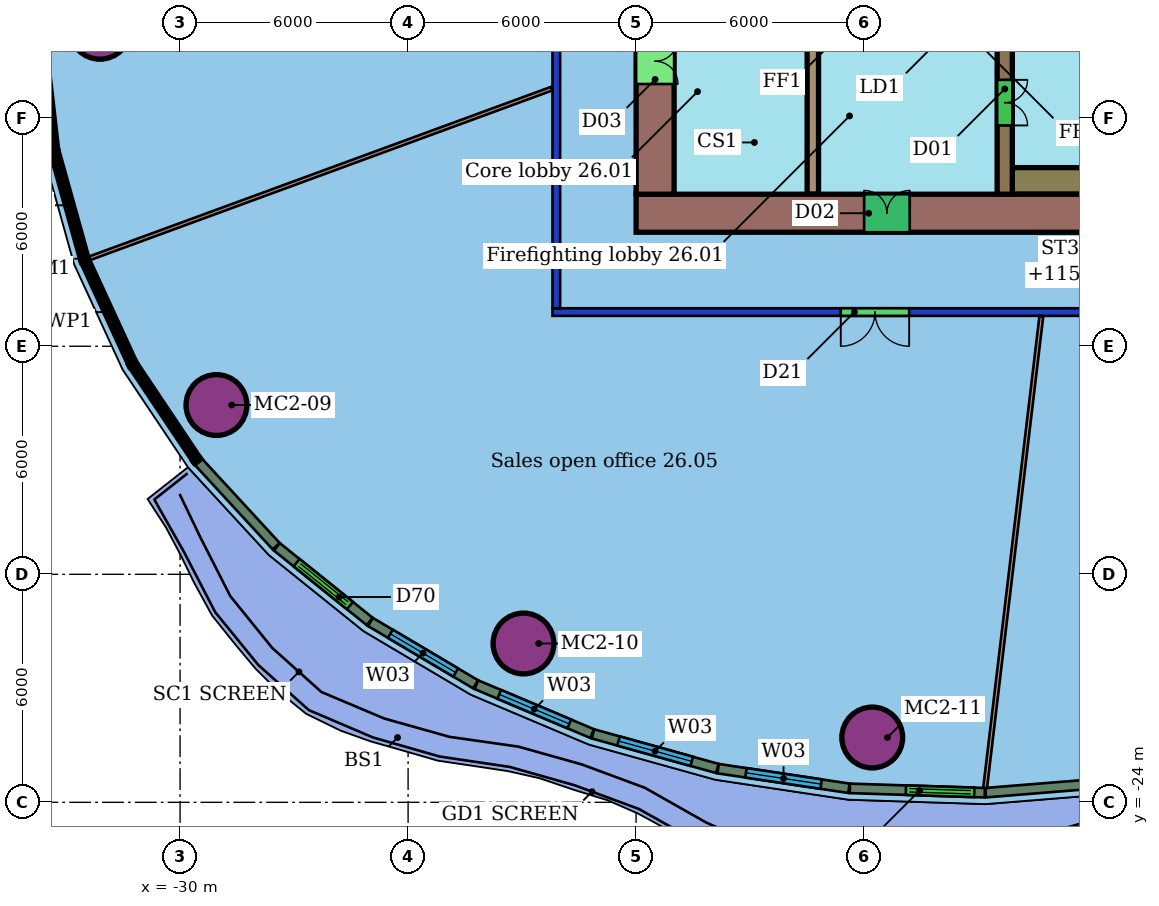
"""IFC4 building model, lengths in metres.
Left out: names, types, materials, properties, quantities, classifications, styles, units other than length and angle.
Written with IfcOpenShell. Run it as: python <this file> out.ifc"""

import sys

from ifc_helpers import new_model, si_unit, direction, frame, frame_2d, origin, origin_2d, place, context, subcontext, project, spatial, rectangle, hollow_circle, extrude, element, fill, save


model = new_model("IFC4")
c1 = context("Model", 3, precision=1e-05, world=origin(), true_north=direction((0.0, 1.0)))
c2 = subcontext(c1, "Body", "Model", "MODEL_VIEW")
j1 = project(units=[si_unit("LENGTHUNIT", "METRE"), si_unit("PLANEANGLEUNIT", "RADIAN")], contexts=[c1])
p1 = place(None, origin())
s1 = spatial("IfcSite", under=j1, at=p1, CompositionType="ELEMENT")
p2 = place(p1, origin())
s2 = spatial("IfcBuilding", under=s1, at=p2, CompositionType="ELEMENT")
p3 = place(p2, frame((0.0, 0.0, 113.8)))
s3 = spatial("IfcBuildingStorey", under=s2, at=p3, CompositionType="ELEMENT", Elevation=113.8)
for number, where, z_axis, x_axis in (
    (1, (-32.109, -3.646, 0.0), (0.0, 0.0, 1.0), (1.0, 0.0, 0.0)),
    (2, (-29.043, -13.547, 0.0), (0.0, 0.0, 1.0), (1.0, 0.0, 0.0)),
    (3, (-20.963, -19.821, 0.0), (0.0, 0.0, 1.0), (1.0, 0.0, 0.0)),
    (4, (-11.787, -22.294, 0.0), (0.0, 0.0, 1.0), (1.0, 0.0, 0.0)),
):
    element("IfcColumn", number, at=place(p3, frame(where, z_axis=z_axis, x_axis=x_axis)), inside=s3, PredefinedType="COLUMN", context=c2, shape_type="SweptSolid", body=[
        extrude(hollow_circle(Radius=0.8, WallThickness=0.055, at=origin_2d()), origin(), (0.0, 0.0, 1.0), 3.45),
    ])
p4 = place(p3, frame((8.2, -11.1, 0.0), z_axis=(0.0, 0.0, 1.0), x_axis=(-1.0, 0.0, 0.0)))
e5 = element("IfcWall", 5, at=p4, inside=s3, PredefinedType="PARTITIONING", context=c2, shape_type="SweptSolid", body=[
    extrude(rectangle(XDim=28.4, YDim=0.2, at=frame_2d((14.2, 0.0))), origin(), (0.0, 0.0, 1.0), 3.0),
])
p5 = place(p4, frame((19.015, 0.0, 0.0)))
e6 = element("IfcOpeningElement", 6, at=p5, cuts=e5, PredefinedType="OPENING", context=c2, shape_type="SweptSolid", body=[
    extrude(rectangle(XDim=1.8, YDim=2.1, at=frame_2d((0.9, 1.05))), frame((0.0, 0.11, 0.0), z_axis=(0.0, -1.0, 0.0), x_axis=(1.0, 0.0, 0.0)), (0.0, 0.0, 1.0), 0.22),
])
p6 = place(p4, frame((9.455, 0.0, 0.0)))
e7 = element("IfcOpeningElement", 7, at=p6, cuts=e5, PredefinedType="OPENING", context=c2, shape_type="SweptSolid", body=[
    extrude(rectangle(XDim=1.8, YDim=2.1, at=frame_2d((0.9, 1.05))), frame((0.0, 0.11, 0.0), z_axis=(0.0, -1.0, 0.0), x_axis=(1.0, 0.0, 0.0)), (0.0, 0.0, 1.0), 0.22),
])
p7 = place(p3, frame((-20.1, -11.0, 0.0), z_axis=(0.0, 0.0, 1.0), x_axis=(0.0, 1.0, 0.0)))
e8 = element("IfcWall", 8, at=p7, inside=s3, PredefinedType="PARTITIONING", context=c2, shape_type="SweptSolid", body=[
    extrude(rectangle(XDim=22.0, YDim=0.2, at=frame_2d((11.0, 0.0))), origin(), (0.0, 0.0, 1.0), 3.0),
])
p8 = place(p7, frame((9.103, 0.0, 0.0)))
e9 = element("IfcOpeningElement", 9, at=p8, cuts=e8, PredefinedType="OPENING", context=c2, shape_type="SweptSolid", body=[
    extrude(rectangle(XDim=1.8, YDim=2.1, at=frame_2d((0.9, 1.05))), frame((0.0, 0.11, 0.0), z_axis=(0.0, -1.0, 0.0), x_axis=(1.0, 0.0, 0.0)), (0.0, 0.0, 1.0), 0.22),
])
p9 = place(p3, frame((-32.393, -9.69, 0.0), z_axis=(0.0, 0.0, 1.0), x_axis=(0.93873651108, 0.344635695722, 0.0)))
e10 = element("IfcWall", 10, at=p9, inside=s3, PredefinedType="PARTITIONING", context=c2, shape_type="SweptSolid", body=[
    extrude(rectangle(XDim=12.97, YDim=0.1, at=frame_2d((6.485, 0.0))), origin(), (0.0, 0.0, 1.0), 3.45),
])
p10 = place(p3, frame((-8.817, -23.622, 0.0), z_axis=(0.0, 0.0, 1.0), x_axis=(0.118395318252, 0.992966539525, 0.0)))
e11 = element("IfcWall", 11, at=p10, inside=s3, PredefinedType="PARTITIONING", context=c2, shape_type="SweptSolid", body=[
    extrude(rectangle(XDim=12.504, YDim=0.1, at=frame_2d((6.252, 0.0))), origin(), (0.0, 0.0, 1.0), 3.45),
])
p11 = place(p3, frame((-29.52, -15.038, 0.0), z_axis=(0.0, 0.0, 1.0), x_axis=(0.677632184293, -0.735400994567, 0.0)))
e12 = element("IfcWall", 12, at=p11, inside=s3, PredefinedType="SOLIDWALL", context=c2, shape_type="SweptSolid", body=[
    extrude(rectangle(XDim=3.022, YDim=0.25, at=frame_2d((1.511, 0.0))), origin(), (0.0, 0.0, 1.0), 3.05),
])
p12 = place(p3, frame((-27.453, -17.278, 0.0), z_axis=(0.0, 0.0, 1.0), x_axis=(0.779353281229, -0.626584761256, 0.0)))
e13 = element("IfcWall", 13, at=p12, inside=s3, PredefinedType="SOLIDWALL", context=c2, shape_type="SweptSolid", body=[
    extrude(rectangle(XDim=3.132, YDim=0.25, at=frame_2d((1.566, 0.0))), origin(), (0.0, 0.0, 1.0), 3.05),
])
p13 = place(p12, frame((0.666, 0.0, 0.0)))
e14 = element("IfcOpeningElement", 14, at=p13, cuts=e13, PredefinedType="OPENING", context=c2, shape_type="SweptSolid", body=[
    extrude(rectangle(XDim=1.8, YDim=2.4, at=frame_2d((0.9, 1.2))), frame((0.0, 0.135, 0.0), z_axis=(0.0, -1.0, 0.0), x_axis=(1.0, 0.0, 0.0)), (0.0, 0.0, 1.0), 0.27),
])
p14 = place(p3, frame((-24.99, -19.255, 0.0), z_axis=(0.0, 0.0, 1.0), x_axis=(0.860327301237, -0.509742027644, 0.0)))
e15 = element("IfcWall", 15, at=p14, inside=s3, PredefinedType="SOLIDWALL", context=c2, shape_type="SweptSolid", body=[
    extrude(rectangle(XDim=3.215, YDim=0.25, at=frame_2d((1.607, 0.0))), origin(), (0.0, 0.0, 1.0), 3.05),
])
p15 = place(p14, frame((0.607, 0.0, 0.9)))
e16 = element("IfcOpeningElement", 16, at=p15, cuts=e15, PredefinedType="OPENING", context=c2, shape_type="SweptSolid", body=[
    extrude(rectangle(XDim=2.0, YDim=2.1, at=frame_2d((1.0, 1.05))), frame((0.0, 0.135, 0.0), z_axis=(0.0, -1.0, 0.0), x_axis=(1.0, 0.0, 0.0)), (0.0, 0.0, 1.0), 0.27),
])
p16 = place(p3, frame((-22.202, -20.906, 0.0), z_axis=(0.0, 0.0, 1.0), x_axis=(0.921226028589, -0.389027767967, 0.0)))
e17 = element("IfcWall", 17, at=p16, inside=s3, PredefinedType="SOLIDWALL", context=c2, shape_type="SweptSolid", body=[
    extrude(rectangle(XDim=3.305, YDim=0.25, at=frame_2d((1.652, 0.0))), origin(), (0.0, 0.0, 1.0), 3.05),
])
p17 = place(p16, frame((0.652, 0.0, 0.9)))
e18 = element("IfcOpeningElement", 18, at=p17, cuts=e17, PredefinedType="OPENING", context=c2, shape_type="SweptSolid", body=[
    extrude(rectangle(XDim=2.0, YDim=2.1, at=frame_2d((1.0, 1.05))), frame((0.0, 0.135, 0.0), z_axis=(0.0, -1.0, 0.0), x_axis=(1.0, 0.0, 0.0)), (0.0, 0.0, 1.0), 0.27),
])
p18 = place(p3, frame((-19.135, -22.199, 0.0), z_axis=(0.0, 0.0, 1.0), x_axis=(0.96343750938, -0.267933136285, 0.0)))
e19 = element("IfcWall", 19, at=p18, inside=s3, PredefinedType="SOLIDWALL", context=c2, shape_type="SweptSolid", body=[
    extrude(rectangle(XDim=3.395, YDim=0.25, at=frame_2d((1.698, 0.0))), origin(), (0.0, 0.0, 1.0), 3.05),
])
p19 = place(p18, frame((0.698, 0.0, 0.9)))
e20 = element("IfcOpeningElement", 20, at=p19, cuts=e19, PredefinedType="OPENING", context=c2, shape_type="SweptSolid", body=[
    extrude(rectangle(XDim=2.0, YDim=2.1, at=frame_2d((1.0, 1.05))), frame((0.0, 0.135, 0.0), z_axis=(0.0, -1.0, 0.0), x_axis=(1.0, 0.0, 0.0)), (0.0, 0.0, 1.0), 0.27),
])
p20 = place(p3, frame((-15.841, -23.114, 0.0), z_axis=(0.0, 0.0, 1.0), x_axis=(0.98891112558, -0.14850853748, 0.0)))
e21 = element("IfcWall", 21, at=p20, inside=s3, PredefinedType="SOLIDWALL", context=c2, shape_type="SweptSolid", body=[
    extrude(rectangle(XDim=3.48, YDim=0.25, at=frame_2d((1.74, 0.0))), origin(), (0.0, 0.0, 1.0), 3.05),
])
p21 = place(p20, frame((0.74, 0.0, 0.9)))
e22 = element("IfcOpeningElement", 22, at=p21, cuts=e21, PredefinedType="OPENING", context=c2, shape_type="SweptSolid", body=[
    extrude(rectangle(XDim=2.0, YDim=2.1, at=frame_2d((1.0, 1.05))), frame((0.0, 0.135, 0.0), z_axis=(0.0, -1.0, 0.0), x_axis=(1.0, 0.0, 0.0)), (0.0, 0.0, 1.0), 0.27),
])
p22 = place(p3, frame((-12.377, -23.633, 0.0), z_axis=(0.0, 0.0, 1.0), x_axis=(0.99948104208, -0.032212521216, 0.0)))
e23 = element("IfcWall", 23, at=p22, inside=s3, PredefinedType="SOLIDWALL", context=c2, shape_type="SweptSolid", body=[
    extrude(rectangle(XDim=3.555, YDim=0.25, at=frame_2d((1.777, 0.0))), origin(), (0.0, 0.0, 1.0), 3.05),
])
p23 = place(p22, frame((1.477, 0.0, 0.0)))
e24 = element("IfcOpeningElement", 24, at=p23, cuts=e23, PredefinedType="OPENING", context=c2, shape_type="SweptSolid", body=[
    extrude(rectangle(XDim=1.8, YDim=2.4, at=frame_2d((0.9, 1.2))), frame((0.0, 0.135, 0.0), z_axis=(0.0, -1.0, 0.0), x_axis=(1.0, 0.0, 0.0)), (0.0, 0.0, 1.0), 0.27),
])
p24 = place(p3, frame((-8.802, -23.747, 0.0), z_axis=(0.0, 0.0, 1.0), x_axis=(0.996755199543, 0.080492684039, 0.0)))
e25 = element("IfcWall", 25, at=p24, inside=s3, PredefinedType="SOLIDWALL", context=c2, shape_type="SweptSolid", body=[
    extrude(rectangle(XDim=3.57, YDim=0.25, at=frame_2d((1.785, 0.0))), origin(), (0.0, 0.0, 1.0), 3.05),
])
p25 = place(p3, frame((-18.0, -8.5, 0.0), z_axis=(0.0, 0.0, 1.0), x_axis=(1.0, 0.0, 0.0)))
e26 = element("IfcWall", 26, at=p25, inside=s3, PredefinedType="SHEAR", context=c2, shape_type="SweptSolid", body=[
    extrude(rectangle(XDim=24.0, YDim=1.0, at=frame_2d((12.0, 0.0))), origin(), (0.0, 0.0, 1.0), 3.3),
])
p26 = place(p25, frame((6.0, 0.0, 0.0)))
e27 = element("IfcOpeningElement", 27, at=p26, cuts=e26, PredefinedType="OPENING", context=c2, shape_type="SweptSolid", body=[
    extrude(rectangle(XDim=1.2, YDim=2.1, at=frame_2d((0.6, 1.05))), frame((0.0, 0.51, 0.0), z_axis=(0.0, -1.0, 0.0), x_axis=(1.0, 0.0, 0.0)), (0.0, 0.0, 1.0), 1.02),
])
p27 = place(p3, frame((-17.5, 8.0, 0.0), z_axis=(0.0, 0.0, 1.0), x_axis=(0.0, -1.0, 0.0)))
e28 = element("IfcWall", 28, at=p27, inside=s3, PredefinedType="SHEAR", context=c2, shape_type="SweptSolid", body=[
    extrude(rectangle(XDim=16.0, YDim=1.0, at=frame_2d((8.0, 0.0))), origin(), (0.0, 0.0, 1.0), 3.3),
])
p28 = place(p27, frame((11.9, 0.0, 0.0)))
e29 = element("IfcOpeningElement", 29, at=p28, cuts=e28, PredefinedType="OPENING", context=c2, shape_type="SweptSolid", body=[
    extrude(rectangle(XDim=1.2, YDim=2.1, at=frame_2d((0.6, 1.05))), frame((0.0, 0.51, 0.0), z_axis=(0.0, -1.0, 0.0), x_axis=(1.0, 0.0, 0.0)), (0.0, 0.0, 1.0), 1.02),
])
p29 = place(p27, frame((2.9, 0.0, 0.0)))
e30 = element("IfcOpeningElement", 30, at=p29, cuts=e28, PredefinedType="OPENING", context=c2, shape_type="SweptSolid", body=[
    extrude(rectangle(XDim=1.2, YDim=2.1, at=frame_2d((0.6, 1.05))), frame((0.0, 0.51, 0.0), z_axis=(0.0, -1.0, 0.0), x_axis=(1.0, 0.0, 0.0)), (0.0, 0.0, 1.0), 1.02),
])
p30 = place(p3, frame((-13.35, 8.0, 0.0), z_axis=(0.0, 0.0, 1.0), x_axis=(0.0, -1.0, 0.0)))
e31 = element("IfcWall", 31, at=p30, inside=s3, PredefinedType="SHEAR", context=c2, shape_type="SweptSolid", body=[
    extrude(rectangle(XDim=16.0, YDim=0.3, at=frame_2d((8.0, 0.0))), origin(), (0.0, 0.0, 1.0), 3.3),
])
p31 = place(p30, frame((7.25, 0.0, 0.0)))
e32 = element("IfcOpeningElement", 32, at=p31, cuts=e31, PredefinedType="OPENING", context=c2, shape_type="SweptSolid", body=[
    extrude(rectangle(XDim=1.5, YDim=2.1, at=frame_2d((0.75, 1.05))), frame((0.0, 0.16, 0.0), z_axis=(0.0, -1.0, 0.0), x_axis=(1.0, 0.0, 0.0)), (0.0, 0.0, 1.0), 0.32),
])
p32 = place(p3, frame((-8.3, -3.88, 0.0), z_axis=(0.0, 0.0, 1.0), x_axis=(0.0, -1.0, 0.0)))
e33 = element("IfcWall", 33, at=p32, inside=s3, PredefinedType="SHEAR", context=c2, shape_type="SweptSolid", body=[
    extrude(rectangle(XDim=4.12, YDim=0.4, at=frame_2d((2.06, 0.0))), origin(), (0.0, 0.0, 1.0), 3.3),
])
p33 = place(p32, frame((1.11, 0.0, 0.0)))
e34 = element("IfcOpeningElement", 34, at=p33, cuts=e33, PredefinedType="OPENING", context=c2, shape_type="SweptSolid", body=[
    extrude(rectangle(XDim=1.2, YDim=2.1, at=frame_2d((0.6, 1.05))), frame((0.0, 0.21, 0.0), z_axis=(0.0, -1.0, 0.0), x_axis=(1.0, 0.0, 0.0)), (0.0, 0.0, 1.0), 0.42),
])
p34 = place(p3, frame((-8.1, -7.65, 0.0), z_axis=(0.0, 0.0, 1.0), x_axis=(1.0, 0.0, 0.0)))
e35 = element("IfcWall", 35, at=p34, inside=s3, PredefinedType="SHEAR", context=c2, shape_type="SweptSolid", body=[
    extrude(rectangle(XDim=7.05, YDim=0.7, at=frame_2d((3.525, 0.0))), origin(), (0.0, 0.0, 1.0), 3.3),
])
p35 = place(p5, origin())
e36 = element("IfcDoor", 36, at=p35, inside=s3, OperationType="DOUBLE_DOOR_SINGLE_SWING", PredefinedType="DOOR", context=c2, shape_type="SweptSolid", body=[
    extrude(rectangle(XDim=1.8, YDim=2.1, at=frame_2d((0.9, 1.05))), frame((0.0, 0.025, 0.0), z_axis=(0.0, -1.0, 0.0), x_axis=(1.0, 0.0, 0.0)), (0.0, 0.0, 1.0), 0.05),
])
fill(e6, e36)
p36 = place(p13, origin())
e37 = element("IfcDoor", 37, at=p36, inside=s3, OperationType="DOUBLE_DOOR_SLIDING", PredefinedType="DOOR", context=c2, shape_type="SweptSolid", body=[
    extrude(rectangle(XDim=1.8, YDim=2.4, at=frame_2d((0.9, 1.2))), frame((0.0, 0.025, 0.0), z_axis=(0.0, -1.0, 0.0), x_axis=(1.0, 0.0, 0.0)), (0.0, 0.0, 1.0), 0.05),
])
fill(e14, e37)
p37 = place(p15, origin())
e38 = element("IfcWindow", 38, at=p37, inside=s3, PartitioningType="SINGLE_PANEL", PredefinedType="WINDOW", context=c2, shape_type="SweptSolid", body=[
    extrude(rectangle(XDim=2.0, YDim=2.1, at=frame_2d((1.0, 1.05))), frame((0.0, 0.03, 0.0), z_axis=(0.0, -1.0, 0.0), x_axis=(1.0, 0.0, 0.0)), (0.0, 0.0, 1.0), 0.06),
])
fill(e16, e38)
p38 = place(p17, origin())
e39 = element("IfcWindow", 39, at=p38, inside=s3, PartitioningType="SINGLE_PANEL", PredefinedType="WINDOW", context=c2, shape_type="SweptSolid", body=[
    extrude(rectangle(XDim=2.0, YDim=2.1, at=frame_2d((1.0, 1.05))), frame((0.0, 0.03, 0.0), z_axis=(0.0, -1.0, 0.0), x_axis=(1.0, 0.0, 0.0)), (0.0, 0.0, 1.0), 0.06),
])
fill(e18, e39)
p39 = place(p19, origin())
e40 = element("IfcWindow", 40, at=p39, inside=s3, PartitioningType="SINGLE_PANEL", PredefinedType="WINDOW", context=c2, shape_type="SweptSolid", body=[
    extrude(rectangle(XDim=2.0, YDim=2.1, at=frame_2d((1.0, 1.05))), frame((0.0, 0.03, 0.0), z_axis=(0.0, -1.0, 0.0), x_axis=(1.0, 0.0, 0.0)), (0.0, 0.0, 1.0), 0.06),
])
fill(e20, e40)
p40 = place(p21, origin())
e41 = element("IfcWindow", 41, at=p40, inside=s3, PartitioningType="SINGLE_PANEL", PredefinedType="WINDOW", context=c2, shape_type="SweptSolid", body=[
    extrude(rectangle(XDim=2.0, YDim=2.1, at=frame_2d((1.0, 1.05))), frame((0.0, 0.03, 0.0), z_axis=(0.0, -1.0, 0.0), x_axis=(1.0, 0.0, 0.0)), (0.0, 0.0, 1.0), 0.06),
])
fill(e22, e41)
p41 = place(p23, origin())
e42 = element("IfcDoor", 42, at=p41, inside=s3, OperationType="DOUBLE_DOOR_SLIDING", PredefinedType="DOOR", context=c2, shape_type="SweptSolid", body=[
    extrude(rectangle(XDim=1.8, YDim=2.4, at=frame_2d((0.9, 1.2))), frame((0.0, 0.025, 0.0), z_axis=(0.0, -1.0, 0.0), x_axis=(1.0, 0.0, 0.0)), (0.0, 0.0, 1.0), 0.05),
])
fill(e24, e42)
p42 = place(p26, origin())
e43 = element("IfcDoor", 43, at=p42, inside=s3, OperationType="DOUBLE_DOOR_SINGLE_SWING", PredefinedType="NOTDEFINED", context=c2, shape_type="SweptSolid", body=[
    extrude(rectangle(XDim=1.2, YDim=2.1, at=frame_2d((0.6, 1.05))), frame((0.0, 0.025, 0.0), z_axis=(0.0, -1.0, 0.0), x_axis=(1.0, 0.0, 0.0)), (0.0, 0.0, 1.0), 0.05),
])
fill(e27, e43)
p43 = place(p28, origin())
e44 = element("IfcDoor", 44, at=p43, inside=s3, OperationType="DOUBLE_DOOR_SINGLE_SWING", PredefinedType="NOTDEFINED", context=c2, shape_type="SweptSolid", body=[
    extrude(rectangle(XDim=1.2, YDim=2.1, at=frame_2d((0.6, 1.05))), frame((0.0, 0.025, 0.0), z_axis=(0.0, -1.0, 0.0), x_axis=(1.0, 0.0, 0.0)), (0.0, 0.0, 1.0), 0.05),
])
fill(e29, e44)
p44 = place(p33, origin())
e45 = element("IfcDoor", 45, at=p44, inside=s3, OperationType="DOUBLE_DOOR_SINGLE_SWING", PredefinedType="NOTDEFINED", context=c2, shape_type="SweptSolid", body=[
    extrude(rectangle(XDim=1.2, YDim=2.1, at=frame_2d((0.6, 1.05))), frame((0.0, 0.025, 0.0), z_axis=(0.0, -1.0, 0.0), x_axis=(1.0, 0.0, 0.0)), (0.0, 0.0, 1.0), 0.05),
])
fill(e34, e45)
save(model, sys.argv[1])
